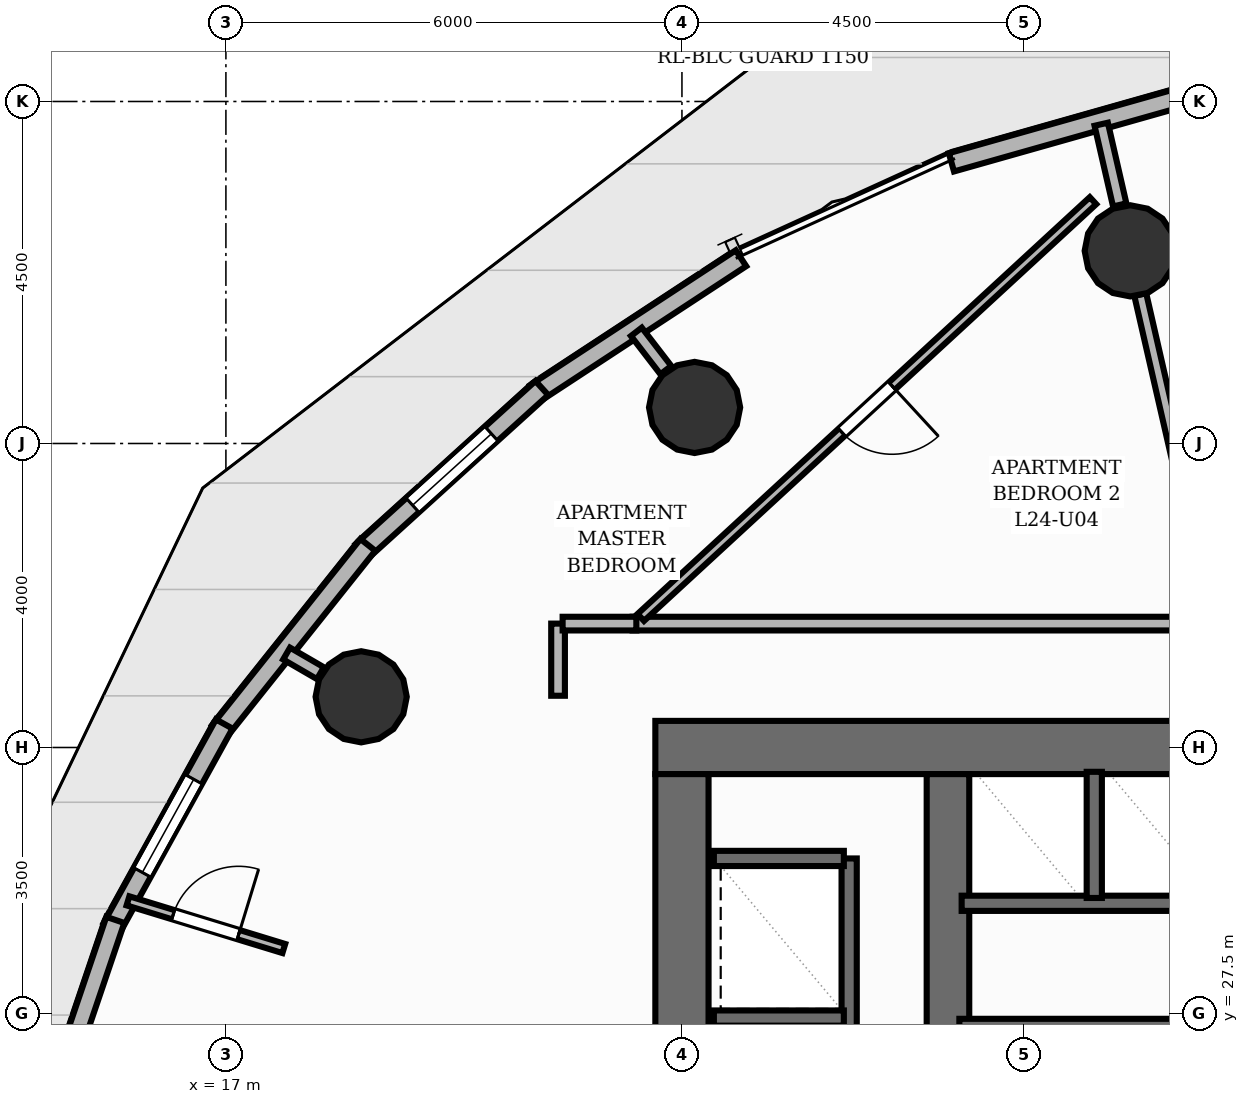
"""IFC4 building model, lengths in metres.
Left out: names, types, materials, properties, quantities, classifications, styles, units other than length and angle.
Written with IfcOpenShell. Run it as: python <this file> out.ifc"""

import sys

from ifc_helpers import new_model, si_unit, direction, frame, frame_2d, origin, origin_2d, place, context, subcontext, project, spatial, rectangle, circle, extrude, element, fill, save


model = new_model("IFC4")
c1 = context("Model", 3, precision=1e-05, world=origin(), true_north=direction((0.0, 1.0)))
c2 = subcontext(c1, "Body", "Model", "MODEL_VIEW")
j1 = project(units=[si_unit("LENGTHUNIT", "METRE"), si_unit("PLANEANGLEUNIT", "RADIAN")], contexts=[c1])
p1 = place(None, origin())
s1 = spatial("IfcSite", under=j1, at=p1, CompositionType="ELEMENT")
p2 = place(p1, origin())
s2 = spatial("IfcBuilding", under=s1, at=p2, CompositionType="ELEMENT")
p3 = place(p2, frame((0.0, 0.0, 83.68)))
s3 = spatial("IfcBuildingStorey", under=s2, at=p3, CompositionType="ELEMENT", Elevation=83.68)
p4 = place(p3, frame((22.65, 31.0, 0.0), z_axis=(0.0, 0.0, 1.0), x_axis=(1.0, 0.0, 0.0)))
e1 = element("IfcWall", 1, at=p4, inside=s3, PredefinedType="SHEAR", context=c2, shape_type="SweptSolid", body=[
    extrude(rectangle(XDim=18.7, YDim=0.7, at=frame_2d((9.35, 0.0))), origin(), (0.0, 0.0, 1.0), 3.2),
])
p5 = place(p4, frame((11.75, 0.0, 0.0)))
e2 = element("IfcOpeningElement", 2, at=p5, cuts=e1, PredefinedType="OPENING", context=c2, shape_type="SweptSolid", body=[
    extrude(rectangle(XDim=1.1, YDim=2.15, at=frame_2d((0.55, 1.075))), frame((0.0, 0.36, 0.0), z_axis=(0.0, -1.0, 0.0), x_axis=(1.0, 0.0, 0.0)), (0.0, 0.0, 1.0), 0.72),
])
p6 = place(p3, frame((23.0, 17.35, 0.0), z_axis=(0.0, 0.0, 1.0), x_axis=(0.0, 1.0, 0.0)))
e3 = element("IfcWall", 3, at=p6, inside=s3, PredefinedType="SHEAR", context=c2, shape_type="SweptSolid", body=[
    extrude(rectangle(XDim=13.3, YDim=0.7, at=frame_2d((6.65, 0.0))), origin(), (0.0, 0.0, 1.0), 3.2),
])
p7 = place(p3, frame((26.5, 17.35, 0.0), z_axis=(0.0, 0.0, 1.0), x_axis=(0.0, 1.0, 0.0)))
e4 = element("IfcWall", 4, at=p7, inside=s3, PredefinedType="SHEAR", context=c2, shape_type="SweptSolid", body=[
    extrude(rectangle(XDim=13.3, YDim=0.56, at=frame_2d((6.65, 0.0))), origin(), (0.0, 0.0, 1.0), 3.2),
])
for number, where, z_axis, x_axis in (
    (5, (28.898, 37.535, 0.0), (0.0, 0.0, 1.0), (1.0, 0.0, 0.0)),
    (6, (23.167, 35.474, 0.0), (0.0, 0.0, 1.0), (1.0, 0.0, 0.0)),
    (7, (18.78, 31.667, 0.0), (0.0, 0.0, 1.0), (1.0, 0.0, 0.0)),
):
    element("IfcColumn", number, at=place(p3, frame(where, z_axis=z_axis, x_axis=x_axis)), inside=s3, PredefinedType="COLUMN", context=c2, shape_type="SweptSolid", body=[
        extrude(circle(Radius=0.6, at=origin_2d()), origin(), (0.0, 0.0, 1.0), 3.2),
    ])
p8 = place(p3, frame((26.545, 38.699, 0.0), z_axis=(0.0, 0.0, 1.0), x_axis=(0.962134911526, 0.272573681825, 0.0)))
e8 = element("IfcWall", 8, at=p8, inside=s3, PredefinedType="SOLIDWALL", context=c2, shape_type="SweptSolid", body=[
    extrude(rectangle(XDim=3.26, YDim=0.25, at=frame_2d((1.63, 0.0))), origin(), (0.0, 0.0, 1.0), 2.96),
])
p9 = place(p3, frame((21.071, 35.663, 0.0), z_axis=(0.0, 0.0, 1.0), x_axis=(0.836273856728, 0.548311988336, 0.0)))
e9 = element("IfcWall", 9, at=p9, inside=s3, PredefinedType="SOLIDWALL", context=c2, shape_type="SweptSolid", body=[
    extrude(rectangle(XDim=3.236, YDim=0.25, at=frame_2d((1.618, 0.0))), origin(), (0.0, 0.0, 1.0), 2.96),
])
p10 = place(p3, frame((18.792, 33.586, 0.0), z_axis=(0.0, 0.0, 1.0), x_axis=(0.740832321657, 0.671690011232, 0.0)))
e10 = element("IfcWall", 10, at=p10, inside=s3, PredefinedType="SOLIDWALL", context=c2, shape_type="SweptSolid", body=[
    extrude(rectangle(XDim=3.192, YDim=0.25, at=frame_2d((1.596, 0.0))), origin(), (0.0, 0.0, 1.0), 2.96),
])
p11 = place(p10, frame((0.896, 0.0, 0.85)))
e11 = element("IfcOpeningElement", 11, at=p11, cuts=e10, PredefinedType="OPENING", context=c2, shape_type="SweptSolid", body=[
    extrude(rectangle(XDim=1.4, YDim=1.55, at=frame_2d((0.7, 0.775))), frame((0.0, 0.135, 0.0), z_axis=(0.0, -1.0, 0.0), x_axis=(1.0, 0.0, 0.0)), (0.0, 0.0, 1.0), 0.27),
])
p12 = place(p3, frame((16.916, 31.217, 0.0), z_axis=(0.0, 0.0, 1.0), x_axis=(0.623134406496, 0.782114768714, 0.0)))
e12 = element("IfcWall", 12, at=p12, inside=s3, PredefinedType="SOLIDWALL", context=c2, shape_type="SweptSolid", body=[
    extrude(rectangle(XDim=3.131, YDim=0.25, at=frame_2d((1.565, 0.0))), origin(), (0.0, 0.0, 1.0), 2.96),
])
p13 = place(p3, frame((15.5, 28.629, 0.0), z_axis=(0.0, 0.0, 1.0), x_axis=(0.482904421948, 0.875673066426, 0.0)))
e13 = element("IfcWall", 13, at=p13, inside=s3, PredefinedType="SOLIDWALL", context=c2, shape_type="SweptSolid", body=[
    extrude(rectangle(XDim=3.061, YDim=0.25, at=frame_2d((1.53, 0.0))), origin(), (0.0, 0.0, 1.0), 2.96),
])
p14 = place(p13, frame((0.83, 0.0, 0.85)))
e14 = element("IfcOpeningElement", 14, at=p14, cuts=e13, PredefinedType="OPENING", context=c2, shape_type="SweptSolid", body=[
    extrude(rectangle(XDim=1.4, YDim=1.55, at=frame_2d((0.7, 0.775))), frame((0.0, 0.135, 0.0), z_axis=(0.0, -1.0, 0.0), x_axis=(1.0, 0.0, 0.0)), (0.0, 0.0, 1.0), 0.27),
])
p15 = place(p3, frame((14.585, 25.901, 0.0), z_axis=(0.0, 0.0, 1.0), x_axis=(0.321149814784, 0.947028403198, 0.0)))
e15 = element("IfcWall", 15, at=p15, inside=s3, PredefinedType="SOLIDWALL", context=c2, shape_type="SweptSolid", body=[
    extrude(rectangle(XDim=2.988, YDim=0.25, at=frame_2d((1.494, 0.0))), origin(), (0.0, 0.0, 1.0), 2.96),
])
p16 = place(p3, frame((26.65, 27.33, 0.0), z_axis=(0.0, 0.0, 1.0), x_axis=(1.0, 0.0, 0.0)))
e16 = element("IfcWall", 16, at=p16, inside=s3, PredefinedType="SHEAR", context=c2, shape_type="SweptSolid", body=[
    extrude(rectangle(XDim=3.24, YDim=0.2, at=frame_2d((1.62, 0.0))), origin(), (0.0, 0.0, 1.0), 3.2),
])
p17 = place(p3, frame((25.2, 18.46, 0.0), z_axis=(0.0, 0.0, 1.0), x_axis=(0.0, 1.0, 0.0)))
e17 = element("IfcWall", 17, at=p17, inside=s3, PredefinedType="SHEAR", context=c2, shape_type="SweptSolid", body=[
    extrude(rectangle(XDim=11.08, YDim=0.2, at=frame_2d((5.54, 0.0))), origin(), (0.0, 0.0, 1.0), 3.2),
])
for number, where, z_axis, x_axis in (
    (18, (23.42, 29.54, 0.0), (0.0, 0.0, 1.0), (1.0, 0.0, 0.0)),
    (19, (23.42, 27.44, 0.0), (0.0, 0.0, 1.0), (1.0, 0.0, 0.0)),
):
    element("IfcWall", number, at=place(p3, frame(where, z_axis=z_axis, x_axis=x_axis)), inside=s3, PredefinedType="SHEAR", context=c2, shape_type="SweptSolid", body=[
        extrude(rectangle(XDim=1.71, YDim=0.2, at=frame_2d((0.855, 0.0))), origin(), (0.0, 0.0, 1.0), 3.2),
    ])
p18 = place(p3, frame((26.68, 28.95, 0.0), z_axis=(0.0, 0.0, 1.0), x_axis=(1.0, 0.0, 0.0)))
e20 = element("IfcWall", 20, at=p18, inside=s3, PredefinedType="SHEAR", context=c2, shape_type="SweptSolid", body=[
    extrude(rectangle(XDim=5.24, YDim=0.2, at=frame_2d((2.62, 0.0))), origin(), (0.0, 0.0, 1.0), 3.2),
])
p19 = place(p3, frame((28.425, 29.02, 0.0), z_axis=(0.0, 0.0, 1.0), x_axis=(0.0, 1.0, 0.0)))
e21 = element("IfcWall", 21, at=p19, inside=s3, PredefinedType="SHEAR", context=c2, shape_type="SweptSolid", body=[
    extrude(rectangle(XDim=1.66, YDim=0.2, at=frame_2d((0.83, 0.0))), origin(), (0.0, 0.0, 1.0), 3.2),
])
p20 = place(p3, frame((28.76, 38.139, 0.0), z_axis=(0.0, 0.0, 1.0), x_axis=(-0.223287406217, 0.974752652843, 0.0)))
e22 = element("IfcWall", 22, at=p20, inside=s3, PredefinedType="PARTITIONING", context=c2, shape_type="SweptSolid", body=[
    extrude(rectangle(XDim=1.089, YDim=0.18, at=frame_2d((0.544, 0.0))), origin(), (0.0, 0.0, 1.0), 2.261),
])
p21 = place(p3, frame((22.788, 35.966, 0.0), z_axis=(0.0, 0.0, 1.0), x_axis=(-0.609970610867, 0.792424036661, 0.0)))
e23 = element("IfcWall", 23, at=p21, inside=s3, PredefinedType="PARTITIONING", context=c2, shape_type="SweptSolid", body=[
    extrude(rectangle(XDim=0.635, YDim=0.18, at=frame_2d((0.318, 0.0))), origin(), (0.0, 0.0, 1.0), 2.261),
])
p22 = place(p3, frame((18.243, 31.978, 0.0), z_axis=(0.0, 0.0, 1.0), x_axis=(-0.864981735625, 0.501803344981, 0.0)))
e24 = element("IfcWall", 24, at=p22, inside=s3, PredefinedType="PARTITIONING", context=c2, shape_type="SweptSolid", body=[
    extrude(rectangle(XDim=0.514, YDim=0.18, at=frame_2d((0.257, 0.0))), origin(), (0.0, 0.0, 1.0), 2.261),
])
p23 = place(p3, frame((22.351, 32.63, 0.0), z_axis=(0.0, 0.0, 1.0), x_axis=(1.0, 0.0, 0.0)))
e25 = element("IfcWall", 25, at=p23, inside=s3, PredefinedType="PARTITIONING", context=c2, shape_type="SweptSolid", body=[
    extrude(rectangle(XDim=20.279, YDim=0.18, at=frame_2d((10.14, 0.0))), origin(), (0.0, 0.0, 1.0), 2.955),
])
p24 = place(p23, frame((11.378, 0.0, 0.0)))
e26 = element("IfcOpeningElement", 26, at=p24, cuts=e25, PredefinedType="OPENING", context=c2, shape_type="SweptSolid", body=[
    extrude(rectangle(XDim=1.05, YDim=2.15, at=frame_2d((0.525, 1.075))), frame((0.0, 0.1, 0.0), z_axis=(0.0, -1.0, 0.0), x_axis=(1.0, 0.0, 0.0)), (0.0, 0.0, 1.0), 0.2),
])
p25 = place(p3, frame((21.37, 31.681, 0.0), z_axis=(0.0, 0.0, 1.0), x_axis=(0.0, 1.0, 0.0)))
e27 = element("IfcWall", 27, at=p25, inside=s3, PredefinedType="PARTITIONING", context=c2, shape_type="SweptSolid", body=[
    extrude(rectangle(XDim=0.949, YDim=0.18, at=frame_2d((0.475, 0.0))), origin(), (0.0, 0.0, 1.0), 2.955),
])
p26 = place(p3, frame((21.43, 32.63, 0.0), z_axis=(0.0, 0.0, 1.0), x_axis=(1.0, 0.0, 0.0)))
e28 = element("IfcWall", 28, at=p26, inside=s3, PredefinedType="PARTITIONING", context=c2, shape_type="SweptSolid", body=[
    extrude(rectangle(XDim=0.97, YDim=0.18, at=frame_2d((0.485, 0.0))), origin(), (0.0, 0.0, 1.0), 2.955),
])
p27 = place(p3, frame((32.923, 35.293, 0.0), z_axis=(0.0, 0.0, 1.0), x_axis=(-0.994472124215, 0.105000924563, 0.0)))
e29 = element("IfcWall", 29, at=p27, inside=s3, PredefinedType="PLUMBINGWALL", context=c2, shape_type="SweptSolid", body=[
    extrude(rectangle(XDim=3.618, YDim=0.16, at=frame_2d((1.809, 0.0))), origin(), (0.0, 0.0, 1.0), 2.955),
])
p28 = place(p3, frame((30.022, 32.63, 0.0), z_axis=(0.0, 0.0, 1.0), x_axis=(-0.223321757884, 0.974744783241, 0.0)))
e30 = element("IfcWall", 30, at=p28, inside=s3, PredefinedType="PLUMBINGWALL", context=c2, shape_type="SweptSolid", body=[
    extrude(rectangle(XDim=4.442, YDim=0.16, at=frame_2d((2.221, 0.0))), origin(), (0.0, 0.0, 1.0), 2.261),
])
p29 = place(p3, frame((15.712, 28.982, 0.0), z_axis=(0.0, 0.0, 1.0), x_axis=(0.956248079097, -0.292557022175, 0.0)))
e31 = element("IfcWall", 31, at=p29, inside=s3, PredefinedType="PARTITIONING", context=c2, shape_type="SweptSolid", body=[
    extrude(rectangle(XDim=2.144, YDim=0.125, at=frame_2d((1.072, 0.0))), origin(), (0.0, 0.0, 1.0), 2.641),
])
p30 = place(p29, frame((0.622, 0.0, 0.0)))
e32 = element("IfcOpeningElement", 32, at=p30, cuts=e31, PredefinedType="OPENING", context=c2, shape_type="SweptSolid", body=[
    extrude(rectangle(XDim=0.9, YDim=2.1, at=frame_2d((0.45, 1.05))), frame((0.0, 0.073, 0.0), z_axis=(0.0, -1.0, 0.0), x_axis=(1.0, 0.0, 0.0)), (0.0, 0.0, 1.0), 0.145),
])
p31 = place(p3, frame((28.408, 38.195, 0.0), z_axis=(0.0, 0.0, 1.0), x_axis=(-0.735306461181, -0.677734762386, 0.0)))
e33 = element("IfcWall", 33, at=p31, inside=s3, PredefinedType="PARTITIONING", context=c2, shape_type="SweptSolid", body=[
    extrude(rectangle(XDim=8.091, YDim=0.125, at=frame_2d((4.045, 0.0))), origin(), (0.0, 0.0, 1.0), 2.404),
])
p32 = place(p31, frame((3.596, 0.0, 0.0)))
e34 = element("IfcOpeningElement", 34, at=p32, cuts=e33, PredefinedType="OPENING", context=c2, shape_type="SweptSolid", body=[
    extrude(rectangle(XDim=0.9, YDim=2.1, at=frame_2d((0.45, 1.05))), frame((0.0, 0.073, 0.0), z_axis=(0.0, -1.0, 0.0), x_axis=(1.0, 0.0, 0.0)), (0.0, 0.0, 1.0), 0.145),
])
p33 = place(p11, origin())
e35 = element("IfcWindow", 35, at=p33, inside=s3, PartitioningType="SINGLE_PANEL", PredefinedType="WINDOW", context=c2, shape_type="SweptSolid", body=[
    extrude(rectangle(XDim=1.4, YDim=1.55, at=frame_2d((0.7, 0.775))), frame((0.0, 0.03, 0.0), z_axis=(0.0, -1.0, 0.0), x_axis=(1.0, 0.0, 0.0)), (0.0, 0.0, 1.0), 0.06),
])
fill(e11, e35)
p34 = place(p14, origin())
e36 = element("IfcWindow", 36, at=p34, inside=s3, PartitioningType="SINGLE_PANEL", PredefinedType="WINDOW", context=c2, shape_type="SweptSolid", body=[
    extrude(rectangle(XDim=1.4, YDim=1.55, at=frame_2d((0.7, 0.775))), frame((0.0, 0.03, 0.0), z_axis=(0.0, -1.0, 0.0), x_axis=(1.0, 0.0, 0.0)), (0.0, 0.0, 1.0), 0.06),
])
fill(e14, e36)
p35 = place(p30, origin())
e37 = element("IfcDoor", 37, at=p35, inside=s3, OperationType="SINGLE_SWING_RIGHT", PredefinedType="DOOR", context=c2, shape_type="SweptSolid", body=[
    extrude(rectangle(XDim=0.9, YDim=2.1, at=frame_2d((0.45, 1.05))), frame((0.0, 0.025, 0.0), z_axis=(0.0, -1.0, 0.0), x_axis=(1.0, 0.0, 0.0)), (0.0, 0.0, 1.0), 0.05),
])
fill(e32, e37)
p36 = place(p32, origin())
e38 = element("IfcDoor", 38, at=p36, inside=s3, OperationType="SINGLE_SWING_LEFT", PredefinedType="DOOR", context=c2, shape_type="SweptSolid", body=[
    extrude(rectangle(XDim=0.9, YDim=2.1, at=frame_2d((0.45, 1.05))), frame((0.0, 0.025, 0.0), z_axis=(0.0, -1.0, 0.0), x_axis=(1.0, 0.0, 0.0)), (0.0, 0.0, 1.0), 0.05),
])
fill(e34, e38)
save(model, sys.argv[1])
